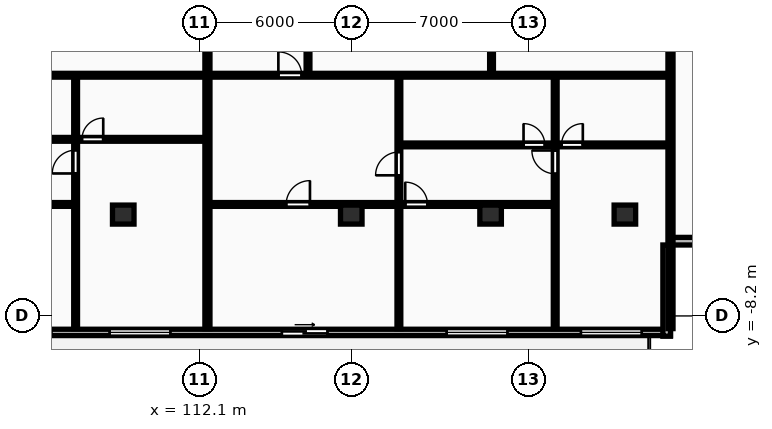
"""IFC4 building model, lengths in metres.
Left out: names, types, materials, properties, quantities, classifications, styles, units other than length and angle.
Written with IfcOpenShell. Run it as: python <this file> out.ifc"""

import sys

from ifc_helpers import new_model, si_unit, direction, frame, frame_2d, origin, origin_2d, place, context, subcontext, project, spatial, rectangle, extrude, element, fill, save


model = new_model("IFC4")
c1 = context("Model", 3, precision=1e-05, world=origin(), true_north=direction((0.0, 1.0)))
c2 = subcontext(c1, "Body", "Model", "MODEL_VIEW")
j1 = project(units=[si_unit("LENGTHUNIT", "METRE"), si_unit("PLANEANGLEUNIT", "RADIAN")], contexts=[c1])
p1 = place(None, origin())
s1 = spatial("IfcSite", under=j1, at=p1, CompositionType="ELEMENT")
p2 = place(p1, origin())
s2 = spatial("IfcBuilding", under=s1, at=p2, CompositionType="ELEMENT")
p3 = place(p2, frame((0.0, 0.0, 119.8)))
s3 = spatial("IfcBuildingStorey", under=s2, at=p3, CompositionType="ELEMENT", Elevation=119.8)
for number, where, z_axis, x_axis in (
    (1, (109.1, -4.2, 0.0), (0.0, 0.0, 1.0), (1.0, 0.0, 0.0)),
    (2, (118.1, -4.2, 0.0), (0.0, 0.0, 1.0), (1.0, 0.0, 0.0)),
    (3, (123.6, -4.2, 0.0), (0.0, 0.0, 1.0), (1.0, 0.0, 0.0)),
    (4, (128.9, -4.2, 0.0), (0.0, 0.0, 1.0), (1.0, 0.0, 0.0)),
):
    element("IfcColumn", number, at=place(p3, frame(where, z_axis=z_axis, x_axis=x_axis)), inside=s3, PredefinedType="COLUMN", context=c2, shape_type="SweptSolid", body=[
        extrude(rectangle(XDim=0.85, YDim=0.75, at=origin_2d()), origin(), (0.0, 0.0, 1.0), 3.25),
    ])
p4 = place(p3, frame((72.7, -8.85, 0.0), z_axis=(0.0, 0.0, 1.0), x_axis=(1.0, 0.0, 0.0)))
e5 = element("IfcWall", 5, at=p4, inside=s3, PredefinedType="STANDARD", context=c2, shape_type="SweptSolid", body=[
    extrude(rectangle(XDim=58.0, YDim=0.25, at=frame_2d((29.0, 0.0))), origin(), (0.0, 0.0, 1.0), 2.97),
])
p5 = place(p4, frame((3.548, 0.0, 0.0)))
e6 = element("IfcOpeningElement", 6, at=p5, cuts=e5, PredefinedType="OPENING", context=c2, shape_type="SweptSolid", body=[
    extrude(rectangle(XDim=1.8, YDim=2.2, at=frame_2d((0.9, 1.1))), frame((0.0, 0.135, 0.0), z_axis=(0.0, -1.0, 0.0), x_axis=(1.0, 0.0, 0.0)), (0.0, 0.0, 1.0), 0.27),
])
p6 = place(p4, frame((13.323, 0.0, 0.85)))
e7 = element("IfcOpeningElement", 7, at=p6, cuts=e5, PredefinedType="OPENING", context=c2, shape_type="SweptSolid", body=[
    extrude(rectangle(XDim=2.4, YDim=1.9, at=frame_2d((1.2, 0.95))), frame((0.0, 0.135, 0.0), z_axis=(0.0, -1.0, 0.0), x_axis=(1.0, 0.0, 0.0)), (0.0, 0.0, 1.0), 0.27),
])
p7 = place(p4, frame((26.598, 0.0, 0.85)))
e8 = element("IfcOpeningElement", 8, at=p7, cuts=e5, PredefinedType="OPENING", context=c2, shape_type="SweptSolid", body=[
    extrude(rectangle(XDim=2.4, YDim=1.9, at=frame_2d((1.2, 0.95))), frame((0.0, 0.135, 0.0), z_axis=(0.0, -1.0, 0.0), x_axis=(1.0, 0.0, 0.0)), (0.0, 0.0, 1.0), 0.27),
])
p8 = place(p4, frame((31.163, 0.0, 0.85)))
e9 = element("IfcOpeningElement", 9, at=p8, cuts=e5, PredefinedType="OPENING", context=c2, shape_type="SweptSolid", body=[
    extrude(rectangle(XDim=2.4, YDim=1.9, at=frame_2d((1.2, 0.95))), frame((0.0, 0.135, 0.0), z_axis=(0.0, -1.0, 0.0), x_axis=(1.0, 0.0, 0.0)), (0.0, 0.0, 1.0), 0.27),
])
p9 = place(p4, frame((22.051, 0.0, 0.0)))
e10 = element("IfcOpeningElement", 10, at=p9, cuts=e5, PredefinedType="OPENING", context=c2, shape_type="SweptSolid", body=[
    extrude(rectangle(XDim=1.8, YDim=2.2, at=frame_2d((0.9, 1.1))), frame((0.0, 0.135, 0.0), z_axis=(0.0, -1.0, 0.0), x_axis=(1.0, 0.0, 0.0)), (0.0, 0.0, 1.0), 0.27),
])
p10 = place(p4, frame((35.861, 0.0, 0.85)))
e11 = element("IfcOpeningElement", 11, at=p10, cuts=e5, PredefinedType="OPENING", context=c2, shape_type="SweptSolid", body=[
    extrude(rectangle(XDim=2.4, YDim=1.9, at=frame_2d((1.2, 0.95))), frame((0.0, 0.135, 0.0), z_axis=(0.0, -1.0, 0.0), x_axis=(1.0, 0.0, 0.0)), (0.0, 0.0, 1.0), 0.27),
])
p11 = place(p4, frame((49.165, 0.0, 0.85)))
e12 = element("IfcOpeningElement", 12, at=p11, cuts=e5, PredefinedType="OPENING", context=c2, shape_type="SweptSolid", body=[
    extrude(rectangle(XDim=2.4, YDim=1.9, at=frame_2d((1.2, 0.95))), frame((0.0, 0.135, 0.0), z_axis=(0.0, -1.0, 0.0), x_axis=(1.0, 0.0, 0.0)), (0.0, 0.0, 1.0), 0.27),
])
p12 = place(p4, frame((42.661, 0.0, 0.0)))
e13 = element("IfcOpeningElement", 13, at=p12, cuts=e5, PredefinedType="OPENING", context=c2, shape_type="SweptSolid", body=[
    extrude(rectangle(XDim=1.8, YDim=2.2, at=frame_2d((0.9, 1.1))), frame((0.0, 0.135, 0.0), z_axis=(0.0, -1.0, 0.0), x_axis=(1.0, 0.0, 0.0)), (0.0, 0.0, 1.0), 0.27),
])
p13 = place(p4, frame((54.465, 0.0, 0.85)))
e14 = element("IfcOpeningElement", 14, at=p13, cuts=e5, PredefinedType="OPENING", context=c2, shape_type="SweptSolid", body=[
    extrude(rectangle(XDim=2.4, YDim=1.9, at=frame_2d((1.2, 0.95))), frame((0.0, 0.135, 0.0), z_axis=(0.0, -1.0, 0.0), x_axis=(1.0, 0.0, 0.0)), (0.0, 0.0, 1.0), 0.27),
])
for number, where, z_axis, x_axis in (
    (15, (130.55, -9.0, 0.0), (0.0, 0.0, 1.0), (0.0, 1.0, 0.0)),
    (16, (130.7, -5.25, 0.0), (0.0, 0.0, 1.0), (1.0, 0.0, 0.0)),
):
    element("IfcWall", number, at=place(p3, frame(where, z_axis=z_axis, x_axis=x_axis)), inside=s3, PredefinedType="STANDARD", context=c2, shape_type="SweptSolid", body=[
        extrude(rectangle(XDim=3.6, YDim=0.3, at=frame_2d((1.8, 0.0))), origin(), (0.0, 0.0, 1.0), 2.97),
    ])
for number, where, z_axis, x_axis in (
    (17, (130.7, -8.7, 0.0), (0.0, 0.0, 1.0), (0.0, 1.0, 0.0)),
    (18, (112.423, -8.7, 0.0), (0.0, 0.0, 1.0), (0.0, 1.0, 0.0)),
):
    element("IfcWall", number, at=place(p3, frame(where, z_axis=z_axis, x_axis=x_axis)), inside=s3, PredefinedType="PARTITIONING", context=c2, shape_type="SweptSolid", body=[
        extrude(rectangle(XDim=24.57, YDim=0.2, at=frame_2d((12.285, 0.0))), origin(), (0.0, 0.0, 1.0), 2.97),
    ])
p14 = place(p3, frame((107.22, -1.21, 0.0), z_axis=(0.0, 0.0, 1.0), x_axis=(0.0, 1.0, 0.0)))
e19 = element("IfcWall", 19, at=p14, inside=s3, PredefinedType="PARTITIONING", context=c2, shape_type="SweptSolid", body=[
    extrude(rectangle(XDim=2.47, YDim=0.15, at=frame_2d((1.235, 0.0))), origin(), (0.0, 0.0, 1.0), 2.97),
])
p15 = place(p3, frame((107.22, -8.7, 0.0), z_axis=(0.0, 0.0, 1.0), x_axis=(0.0, 1.0, 0.0)))
e20 = element("IfcWall", 20, at=p15, inside=s3, PredefinedType="PARTITIONING", context=c2, shape_type="SweptSolid", body=[
    extrude(rectangle(XDim=7.45, YDim=0.15, at=frame_2d((3.725, 0.0))), origin(), (0.0, 0.0, 1.0), 2.97),
])
p16 = place(p15, frame((6.123, 0.0, 0.0)))
e21 = element("IfcOpeningElement", 21, at=p16, cuts=e20, PredefinedType="OPENING", context=c2, shape_type="SweptSolid", body=[
    extrude(rectangle(XDim=0.92, YDim=2.08, at=frame_2d((0.46, 1.04))), frame((0.0, 0.085, 0.0), z_axis=(0.0, -1.0, 0.0), x_axis=(1.0, 0.0, 0.0)), (0.0, 0.0, 1.0), 0.17),
])
p17 = place(p3, frame((98.131, -1.23, 0.0), z_axis=(0.0, 0.0, 1.0), x_axis=(1.0, 0.0, 0.0)))
e22 = element("IfcWall", 22, at=p17, inside=s3, PredefinedType="PARTITIONING", context=c2, shape_type="SweptSolid", body=[
    extrude(rectangle(XDim=14.212, YDim=0.15, at=frame_2d((7.106, 0.0))), origin(), (0.0, 0.0, 1.0), 2.97),
])
p18 = place(p17, frame((1.034, 0.0, 0.0)))
e23 = element("IfcOpeningElement", 23, at=p18, cuts=e22, PredefinedType="OPENING", context=c2, shape_type="SweptSolid", body=[
    extrude(rectangle(XDim=0.84, YDim=2.04, at=frame_2d((0.42, 1.02))), frame((0.0, 0.085, 0.0), z_axis=(0.0, -1.0, 0.0), x_axis=(1.0, 0.0, 0.0)), (0.0, 0.0, 1.0), 0.17),
])
p19 = place(p17, frame((6.686, 0.0, 0.0)))
e24 = element("IfcOpeningElement", 24, at=p19, cuts=e22, PredefinedType="OPENING", context=c2, shape_type="SweptSolid", body=[
    extrude(rectangle(XDim=0.84, YDim=2.04, at=frame_2d((0.42, 1.02))), frame((0.0, 0.085, 0.0), z_axis=(0.0, -1.0, 0.0), x_axis=(1.0, 0.0, 0.0)), (0.0, 0.0, 1.0), 0.17),
])
p20 = place(p17, frame((9.339, 0.0, 0.0)))
e25 = element("IfcOpeningElement", 25, at=p20, cuts=e22, PredefinedType="OPENING", context=c2, shape_type="SweptSolid", body=[
    extrude(rectangle(XDim=0.84, YDim=2.04, at=frame_2d((0.42, 1.02))), frame((0.0, 0.085, 0.0), z_axis=(0.0, -1.0, 0.0), x_axis=(1.0, 0.0, 0.0)), (0.0, 0.0, 1.0), 0.17),
])
p21 = place(p3, frame((93.171, 1.3, 0.0), z_axis=(0.0, 0.0, 1.0), x_axis=(1.0, 0.0, 0.0)))
e26 = element("IfcWall", 26, at=p21, inside=s3, PredefinedType="PARTITIONING", context=c2, shape_type="SweptSolid", body=[
    extrude(rectangle(XDim=19.172, YDim=0.15, at=frame_2d((9.586, 0.0))), origin(), (0.0, 0.0, 1.0), 2.97),
])
p22 = place(p21, frame((2.72, 0.0, 0.0)))
e27 = element("IfcOpeningElement", 27, at=p22, cuts=e26, PredefinedType="OPENING", context=c2, shape_type="SweptSolid", body=[
    extrude(rectangle(XDim=0.92, YDim=2.08, at=frame_2d((0.46, 1.04))), frame((0.0, 0.085, 0.0), z_axis=(0.0, -1.0, 0.0), x_axis=(1.0, 0.0, 0.0)), (0.0, 0.0, 1.0), 0.17),
])
p23 = place(p3, frame((93.171, -3.8, 0.0), z_axis=(0.0, 0.0, 1.0), x_axis=(1.0, 0.0, 0.0)))
e28 = element("IfcWall", 28, at=p23, inside=s3, PredefinedType="PARTITIONING", context=c2, shape_type="SweptSolid", body=[
    extrude(rectangle(XDim=14.049, YDim=0.15, at=frame_2d((7.024, 0.0))), origin(), (0.0, 0.0, 1.0), 2.97),
])
p24 = place(p23, frame((3.73, 0.0, 0.0)))
e29 = element("IfcOpeningElement", 29, at=p24, cuts=e28, PredefinedType="OPENING", context=c2, shape_type="SweptSolid", body=[
    extrude(rectangle(XDim=0.94, YDim=2.1, at=frame_2d((0.47, 1.05))), frame((0.0, 0.085, 0.0), z_axis=(0.0, -1.0, 0.0), x_axis=(1.0, 0.0, 0.0)), (0.0, 0.0, 1.0), 0.17),
])
p25 = place(p23, frame((8.565, 0.0, 0.0)))
e30 = element("IfcOpeningElement", 30, at=p25, cuts=e28, PredefinedType="OPENING", context=c2, shape_type="SweptSolid", body=[
    extrude(rectangle(XDim=0.88, YDim=2.06, at=frame_2d((0.44, 1.03))), frame((0.0, 0.085, 0.0), z_axis=(0.0, -1.0, 0.0), x_axis=(1.0, 0.0, 0.0)), (0.0, 0.0, 1.0), 0.17),
])
p26 = place(p23, frame((10.014, 0.0, 0.0)))
e31 = element("IfcOpeningElement", 31, at=p26, cuts=e28, PredefinedType="OPENING", context=c2, shape_type="SweptSolid", body=[
    extrude(rectangle(XDim=0.88, YDim=2.06, at=frame_2d((0.44, 1.03))), frame((0.0, 0.085, 0.0), z_axis=(0.0, -1.0, 0.0), x_axis=(1.0, 0.0, 0.0)), (0.0, 0.0, 1.0), 0.17),
])
p27 = place(p3, frame((123.636, 1.34, 0.0), z_axis=(0.0, 0.0, 1.0), x_axis=(0.0, 1.0, 0.0)))
e32 = element("IfcWall", 32, at=p27, inside=s3, PredefinedType="PARTITIONING", context=c2, shape_type="SweptSolid", body=[
    extrude(rectangle(XDim=14.55, YDim=0.15, at=frame_2d((7.275, 0.0))), origin(), (0.0, 0.0, 1.0), 2.2),
])
p28 = place(p27, frame((2.951, 0.0, 0.0)))
e33 = element("IfcOpeningElement", 33, at=p28, cuts=e32, PredefinedType="OPENING", context=c2, shape_type="SweptSolid", body=[
    extrude(rectangle(XDim=0.84, YDim=2.04, at=frame_2d((0.42, 1.02))), frame((0.0, 0.085, 0.0), z_axis=(0.0, -1.0, 0.0), x_axis=(1.0, 0.0, 0.0)), (0.0, 0.0, 1.0), 0.17),
])
p29 = place(p27, frame((7.345, 0.0, 0.0)))
e34 = element("IfcOpeningElement", 34, at=p29, cuts=e32, PredefinedType="OPENING", context=c2, shape_type="SweptSolid", body=[
    extrude(rectangle(XDim=0.88, YDim=2.06, at=frame_2d((0.44, 1.03))), frame((0.0, 0.085, 0.0), z_axis=(0.0, -1.0, 0.0), x_axis=(1.0, 0.0, 0.0)), (0.0, 0.0, 1.0), 0.17),
])
p30 = place(p3, frame((116.393, 1.34, 0.0), z_axis=(0.0, 0.0, 1.0), x_axis=(0.0, 1.0, 0.0)))
e35 = element("IfcWall", 35, at=p30, inside=s3, PredefinedType="PARTITIONING", context=c2, shape_type="SweptSolid", body=[
    extrude(rectangle(XDim=14.55, YDim=0.15, at=frame_2d((7.275, 0.0))), origin(), (0.0, 0.0, 1.0), 2.97),
])
p31 = place(p30, frame((2.933, 0.0, 0.0)))
e36 = element("IfcOpeningElement", 36, at=p31, cuts=e35, PredefinedType="OPENING", context=c2, shape_type="SweptSolid", body=[
    extrude(rectangle(XDim=0.88, YDim=2.06, at=frame_2d((0.44, 1.03))), frame((0.0, 0.085, 0.0), z_axis=(0.0, -1.0, 0.0), x_axis=(1.0, 0.0, 0.0)), (0.0, 0.0, 1.0), 0.17),
])
p32 = place(p3, frame((119.98, -8.7, 0.0), z_axis=(0.0, 0.0, 1.0), x_axis=(0.0, 1.0, 0.0)))
e37 = element("IfcWall", 37, at=p32, inside=s3, PredefinedType="PARTITIONING", context=c2, shape_type="SweptSolid", body=[
    extrude(rectangle(XDim=9.96, YDim=0.15, at=frame_2d((4.98, 0.0))), origin(), (0.0, 0.0, 1.0), 2.97),
])
p33 = place(p32, frame((6.05, 0.0, 0.0)))
e38 = element("IfcOpeningElement", 38, at=p33, cuts=e37, PredefinedType="OPENING", context=c2, shape_type="SweptSolid", body=[
    extrude(rectangle(XDim=0.92, YDim=2.08, at=frame_2d((0.46, 1.04))), frame((0.0, 0.085, 0.0), z_axis=(0.0, -1.0, 0.0), x_axis=(1.0, 0.0, 0.0)), (0.0, 0.0, 1.0), 0.17),
])
p34 = place(p3, frame((126.15, -1.43, 0.0), z_axis=(0.0, 0.0, 1.0), x_axis=(0.0, 1.0, 0.0)))
e39 = element("IfcWall", 39, at=p34, inside=s3, PredefinedType="PARTITIONING", context=c2, shape_type="SweptSolid", body=[
    extrude(rectangle(XDim=2.69, YDim=0.15, at=frame_2d((1.345, 0.0))), origin(), (0.0, 0.0, 1.0), 2.97),
])
p35 = place(p3, frame((126.15, -8.7, 0.0), z_axis=(0.0, 0.0, 1.0), x_axis=(0.0, 1.0, 0.0)))
e40 = element("IfcWall", 40, at=p35, inside=s3, PredefinedType="PARTITIONING", context=c2, shape_type="SweptSolid", body=[
    extrude(rectangle(XDim=7.23, YDim=0.15, at=frame_2d((3.615, 0.0))), origin(), (0.0, 0.0, 1.0), 2.97),
])
p36 = place(p35, frame((6.11, 0.0, 0.0)))
e41 = element("IfcOpeningElement", 41, at=p36, cuts=e40, PredefinedType="OPENING", context=c2, shape_type="SweptSolid", body=[
    extrude(rectangle(XDim=0.92, YDim=2.08, at=frame_2d((0.46, 1.04))), frame((0.0, 0.085, 0.0), z_axis=(0.0, -1.0, 0.0), x_axis=(1.0, 0.0, 0.0)), (0.0, 0.0, 1.0), 0.17),
])
p37 = place(p3, frame((120.02, -1.45, 0.0), z_axis=(0.0, 0.0, 1.0), x_axis=(1.0, 0.0, 0.0)))
e42 = element("IfcWall", 42, at=p37, inside=s3, PredefinedType="PARTITIONING", context=c2, shape_type="SweptSolid", body=[
    extrude(rectangle(XDim=10.6, YDim=0.15, at=frame_2d((5.3, 0.0))), origin(), (0.0, 0.0, 1.0), 2.97),
])
p38 = place(p37, frame((4.88, 0.0, 0.0)))
e43 = element("IfcOpeningElement", 43, at=p38, cuts=e42, PredefinedType="OPENING", context=c2, shape_type="SweptSolid", body=[
    extrude(rectangle(XDim=0.84, YDim=2.04, at=frame_2d((0.42, 1.02))), frame((0.0, 0.085, 0.0), z_axis=(0.0, -1.0, 0.0), x_axis=(1.0, 0.0, 0.0)), (0.0, 0.0, 1.0), 0.17),
])
p39 = place(p37, frame((6.38, 0.0, 0.0)))
e44 = element("IfcOpeningElement", 44, at=p39, cuts=e42, PredefinedType="OPENING", context=c2, shape_type="SweptSolid", body=[
    extrude(rectangle(XDim=0.84, YDim=2.04, at=frame_2d((0.42, 1.02))), frame((0.0, 0.085, 0.0), z_axis=(0.0, -1.0, 0.0), x_axis=(1.0, 0.0, 0.0)), (0.0, 0.0, 1.0), 0.17),
])
p40 = place(p3, frame((112.503, 1.3, 0.0), z_axis=(0.0, 0.0, 1.0), x_axis=(1.0, 0.0, 0.0)))
e45 = element("IfcWall", 45, at=p40, inside=s3, PredefinedType="PARTITIONING", context=c2, shape_type="SweptSolid", body=[
    extrude(rectangle(XDim=18.117, YDim=0.15, at=frame_2d((9.059, 0.0))), origin(), (0.0, 0.0, 1.0), 2.97),
])
p41 = place(p40, frame((2.72, 0.0, 0.0)))
e46 = element("IfcOpeningElement", 46, at=p41, cuts=e45, PredefinedType="OPENING", context=c2, shape_type="SweptSolid", body=[
    extrude(rectangle(XDim=0.92, YDim=2.08, at=frame_2d((0.46, 1.04))), frame((0.0, 0.085, 0.0), z_axis=(0.0, -1.0, 0.0), x_axis=(1.0, 0.0, 0.0)), (0.0, 0.0, 1.0), 0.17),
])
p42 = place(p3, frame((112.503, -3.8, 0.0), z_axis=(0.0, 0.0, 1.0), x_axis=(1.0, 0.0, 0.0)))
e47 = element("IfcWall", 47, at=p42, inside=s3, PredefinedType="PARTITIONING", context=c2, shape_type="SweptSolid", body=[
    extrude(rectangle(XDim=13.647, YDim=0.15, at=frame_2d((6.824, 0.0))), origin(), (0.0, 0.0, 1.0), 2.97),
])
p43 = place(p42, frame((3.027, 0.0, 0.0)))
e48 = element("IfcOpeningElement", 48, at=p43, cuts=e47, PredefinedType="OPENING", context=c2, shape_type="SweptSolid", body=[
    extrude(rectangle(XDim=0.94, YDim=2.1, at=frame_2d((0.47, 1.05))), frame((0.0, 0.085, 0.0), z_axis=(0.0, -1.0, 0.0), x_axis=(1.0, 0.0, 0.0)), (0.0, 0.0, 1.0), 0.17),
])
p44 = place(p42, frame((7.727, 0.0, 0.0)))
e49 = element("IfcOpeningElement", 49, at=p44, cuts=e47, PredefinedType="OPENING", context=c2, shape_type="SweptSolid", body=[
    extrude(rectangle(XDim=0.88, YDim=2.06, at=frame_2d((0.44, 1.03))), frame((0.0, 0.085, 0.0), z_axis=(0.0, -1.0, 0.0), x_axis=(1.0, 0.0, 0.0)), (0.0, 0.0, 1.0), 0.17),
])
p45 = place(p10, origin())
e50 = element("IfcWindow", 50, at=p45, inside=s3, PartitioningType="DOUBLE_PANEL_VERTICAL", PredefinedType="WINDOW", context=c2, shape_type="SweptSolid", body=[
    extrude(rectangle(XDim=2.4, YDim=1.9, at=frame_2d((1.2, 0.95))), frame((0.0, 0.03, 0.0), z_axis=(0.0, -1.0, 0.0), x_axis=(1.0, 0.0, 0.0)), (0.0, 0.0, 1.0), 0.06),
])
fill(e11, e50)
p46 = place(p11, origin())
e51 = element("IfcWindow", 51, at=p46, inside=s3, PartitioningType="DOUBLE_PANEL_VERTICAL", PredefinedType="WINDOW", context=c2, shape_type="SweptSolid", body=[
    extrude(rectangle(XDim=2.4, YDim=1.9, at=frame_2d((1.2, 0.95))), frame((0.0, 0.03, 0.0), z_axis=(0.0, -1.0, 0.0), x_axis=(1.0, 0.0, 0.0)), (0.0, 0.0, 1.0), 0.06),
])
fill(e12, e51)
p47 = place(p12, origin())
e52 = element("IfcDoor", 52, at=p47, inside=s3, OperationType="SLIDING_TO_RIGHT", PredefinedType="DOOR", context=c2, shape_type="SweptSolid", body=[
    extrude(rectangle(XDim=1.8, YDim=2.2, at=frame_2d((0.9, 1.1))), frame((0.0, 0.025, 0.0), z_axis=(0.0, -1.0, 0.0), x_axis=(1.0, 0.0, 0.0)), (0.0, 0.0, 1.0), 0.05),
])
fill(e13, e52)
p48 = place(p13, origin())
e53 = element("IfcWindow", 53, at=p48, inside=s3, PartitioningType="DOUBLE_PANEL_VERTICAL", PredefinedType="WINDOW", context=c2, shape_type="SweptSolid", body=[
    extrude(rectangle(XDim=2.4, YDim=1.9, at=frame_2d((1.2, 0.95))), frame((0.0, 0.03, 0.0), z_axis=(0.0, -1.0, 0.0), x_axis=(1.0, 0.0, 0.0)), (0.0, 0.0, 1.0), 0.06),
])
fill(e14, e53)
p49 = place(p16, origin())
e54 = element("IfcDoor", 54, at=p49, inside=s3, OperationType="SINGLE_SWING_LEFT", PredefinedType="DOOR", context=c2, shape_type="SweptSolid", body=[
    extrude(rectangle(XDim=0.92, YDim=2.08, at=frame_2d((0.46, 1.04))), frame((0.0, 0.025, 0.0), z_axis=(0.0, -1.0, 0.0), x_axis=(1.0, 0.0, 0.0)), (0.0, 0.0, 1.0), 0.05),
])
fill(e21, e54)
p50 = place(p20, origin())
e55 = element("IfcDoor", 55, at=p50, inside=s3, OperationType="SINGLE_SWING_RIGHT", PredefinedType="DOOR", context=c2, shape_type="SweptSolid", body=[
    extrude(rectangle(XDim=0.84, YDim=2.04, at=frame_2d((0.42, 1.02))), frame((0.0, 0.025, 0.0), z_axis=(0.0, -1.0, 0.0), x_axis=(1.0, 0.0, 0.0)), (0.0, 0.0, 1.0), 0.05),
])
fill(e25, e55)
p51 = place(p33, origin())
e56 = element("IfcDoor", 56, at=p51, inside=s3, OperationType="SINGLE_SWING_LEFT", PredefinedType="DOOR", context=c2, shape_type="SweptSolid", body=[
    extrude(rectangle(XDim=0.92, YDim=2.08, at=frame_2d((0.46, 1.04))), frame((0.0, 0.025, 0.0), z_axis=(0.0, -1.0, 0.0), x_axis=(1.0, 0.0, 0.0)), (0.0, 0.0, 1.0), 0.05),
])
fill(e38, e56)
p52 = place(p36, origin())
e57 = element("IfcDoor", 57, at=p52, inside=s3, OperationType="SINGLE_SWING_RIGHT", PredefinedType="DOOR", context=c2, shape_type="SweptSolid", body=[
    extrude(rectangle(XDim=0.92, YDim=2.08, at=frame_2d((0.46, 1.04))), frame((0.0, 0.025, 0.0), z_axis=(0.0, -1.0, 0.0), x_axis=(1.0, 0.0, 0.0)), (0.0, 0.0, 1.0), 0.05),
])
fill(e41, e57)
p53 = place(p38, origin())
e58 = element("IfcDoor", 58, at=p53, inside=s3, OperationType="SINGLE_SWING_LEFT", PredefinedType="DOOR", context=c2, shape_type="SweptSolid", body=[
    extrude(rectangle(XDim=0.84, YDim=2.04, at=frame_2d((0.42, 1.02))), frame((0.0, 0.025, 0.0), z_axis=(0.0, -1.0, 0.0), x_axis=(1.0, 0.0, 0.0)), (0.0, 0.0, 1.0), 0.05),
])
fill(e43, e58)
p54 = place(p39, origin())
e59 = element("IfcDoor", 59, at=p54, inside=s3, OperationType="SINGLE_SWING_RIGHT", PredefinedType="DOOR", context=c2, shape_type="SweptSolid", body=[
    extrude(rectangle(XDim=0.84, YDim=2.04, at=frame_2d((0.42, 1.02))), frame((0.0, 0.025, 0.0), z_axis=(0.0, -1.0, 0.0), x_axis=(1.0, 0.0, 0.0)), (0.0, 0.0, 1.0), 0.05),
])
fill(e44, e59)
p55 = place(p41, origin())
e60 = element("IfcDoor", 60, at=p55, inside=s3, OperationType="SINGLE_SWING_LEFT", PredefinedType="DOOR", context=c2, shape_type="SweptSolid", body=[
    extrude(rectangle(XDim=0.92, YDim=2.08, at=frame_2d((0.46, 1.04))), frame((0.0, 0.025, 0.0), z_axis=(0.0, -1.0, 0.0), x_axis=(1.0, 0.0, 0.0)), (0.0, 0.0, 1.0), 0.05),
])
fill(e46, e60)
p56 = place(p43, origin())
e61 = element("IfcDoor", 61, at=p56, inside=s3, OperationType="SINGLE_SWING_RIGHT", PredefinedType="DOOR", context=c2, shape_type="SweptSolid", body=[
    extrude(rectangle(XDim=0.94, YDim=2.1, at=frame_2d((0.47, 1.05))), frame((0.0, 0.025, 0.0), z_axis=(0.0, -1.0, 0.0), x_axis=(1.0, 0.0, 0.0)), (0.0, 0.0, 1.0), 0.05),
])
fill(e48, e61)
p57 = place(p44, origin())
e62 = element("IfcDoor", 62, at=p57, inside=s3, OperationType="SINGLE_SWING_LEFT", PredefinedType="DOOR", context=c2, shape_type="SweptSolid", body=[
    extrude(rectangle(XDim=0.88, YDim=2.06, at=frame_2d((0.44, 1.03))), frame((0.0, 0.025, 0.0), z_axis=(0.0, -1.0, 0.0), x_axis=(1.0, 0.0, 0.0)), (0.0, 0.0, 1.0), 0.05),
])
fill(e49, e62)
save(model, sys.argv[1])
